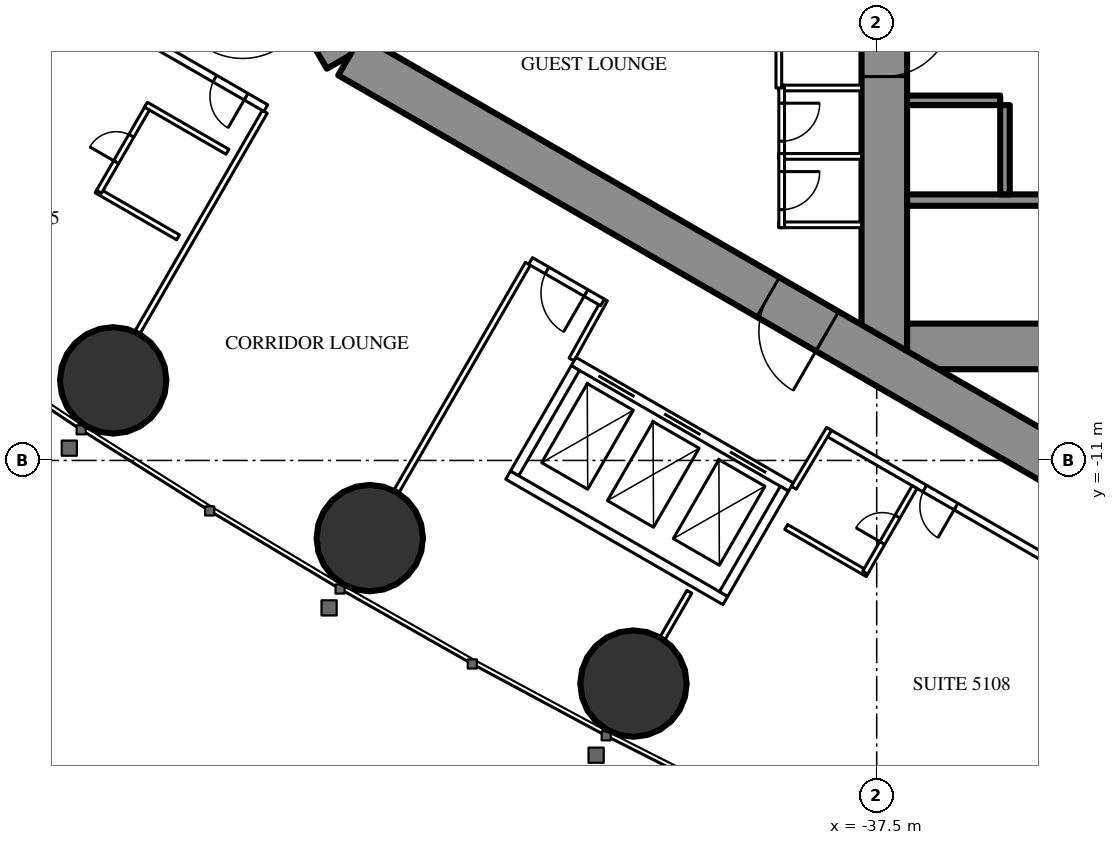
"""IFC4 building model, lengths in metres.
Left out: names, types, materials, properties, quantities, classifications, styles, units other than length and angle.
Written with IfcOpenShell. Run it as: python <this file> out.ifc"""

import sys

from ifc_helpers import new_model, si_unit, direction, frame, frame_2d, origin, origin_2d, place, context, subcontext, project, spatial, rectangle, circle, extrude, element, fill, save


model = new_model("IFC4")
c1 = context("Model", 3, precision=1e-05, world=origin(), true_north=direction((0.0, 1.0)))
c2 = subcontext(c1, "Body", "Model", "MODEL_VIEW")
j1 = project(units=[si_unit("LENGTHUNIT", "METRE"), si_unit("PLANEANGLEUNIT", "RADIAN")], contexts=[c1])
p1 = place(None, origin())
s1 = spatial("IfcSite", under=j1, at=p1, CompositionType="ELEMENT")
p2 = place(p1, origin())
s2 = spatial("IfcBuilding", under=s1, at=p2, CompositionType="ELEMENT")
p3 = place(p2, frame((0.0, 0.0, 191.3)))
s3 = spatial("IfcBuildingStorey", under=s2, at=p3, CompositionType="ELEMENT", Elevation=191.3)
for number, where, z_axis, x_axis in (
    (1, (-57.59, -8.893, 0.0), (0.0, 0.0, 1.0), (1.0, 0.0, 0.0)),
    (2, (-50.839, -13.043, 0.0), (0.0, 0.0, 1.0), (1.0, 0.0, 0.0)),
    (3, (-43.9, -16.871, 0.0), (0.0, 0.0, 1.0), (1.0, 0.0, 0.0)),
):
    element("IfcColumn", number, at=place(p3, frame(where, z_axis=z_axis, x_axis=x_axis)), inside=s3, PredefinedType="COLUMN", context=c2, shape_type="SweptSolid", body=[
        extrude(circle(Radius=1.4, at=origin_2d()), origin(), (0.0, 0.0, 1.0), 3.5),
    ])
p4 = place(p3, frame((-37.3, 8.6, 0.0), z_axis=(0.0, 0.0, 1.0), x_axis=(0.0, -1.0, 0.0)))
e4 = element("IfcWall", 4, at=p4, inside=s3, PredefinedType="SHEAR", context=c2, shape_type="SweptSolid", body=[
    extrude(rectangle(XDim=17.2, YDim=1.2, at=frame_2d((8.6, 0.0))), origin(), (0.0, 0.0, 1.0), 3.5),
])
p5 = place(p4, frame((7.7, 0.0, 0.0)))
e5 = element("IfcOpeningElement", 5, at=p5, cuts=e4, PredefinedType="OPENING", context=c2, shape_type="SweptSolid", body=[
    extrude(rectangle(XDim=1.8, YDim=2.2, at=frame_2d((0.9, 1.1))), frame((0.0, 0.61, 0.0), z_axis=(0.0, -1.0, 0.0), x_axis=(1.0, 0.0, 0.0)), (0.0, 0.0, 1.0), 1.22),
])
p6 = place(p3, frame((-28.3, -8.0, 0.0), z_axis=(0.0, 0.0, 1.0), x_axis=(-1.0, 0.0, 0.0)))
e6 = element("IfcWall", 6, at=p6, inside=s3, PredefinedType="SHEAR", context=c2, shape_type="SweptSolid", body=[
    extrude(rectangle(XDim=8.4, YDim=1.2, at=frame_2d((4.2, 0.0))), origin(), (0.0, 0.0, 1.0), 3.5),
])
p7 = place(p6, frame((0.25, 0.0, 0.0)))
e7 = element("IfcOpeningElement", 7, at=p7, cuts=e6, PredefinedType="OPENING", context=c2, shape_type="SweptSolid", body=[
    extrude(rectangle(XDim=1.0, YDim=2.2, at=frame_2d((0.5, 1.1))), frame((0.0, 0.61, 0.0), z_axis=(0.0, -1.0, 0.0), x_axis=(1.0, 0.0, 0.0)), (0.0, 0.0, 1.0), 1.22),
])
p8 = place(p3, frame((-28.3, -4.15, 0.0), z_axis=(0.0, 0.0, 1.0), x_axis=(-1.0, 0.0, 0.0)))
e8 = element("IfcWall", 8, at=p8, inside=s3, PredefinedType="SHEAR", context=c2, shape_type="SweptSolid", body=[
    extrude(rectangle(XDim=8.4, YDim=0.3, at=frame_2d((4.2, 0.0))), origin(), (0.0, 0.0, 1.0), 3.5),
])
p9 = place(p3, frame((-34.125, -1.65, 0.0), z_axis=(0.0, 0.0, 1.0), x_axis=(0.0, -1.0, 0.0)))
e9 = element("IfcWall", 9, at=p9, inside=s3, PredefinedType="SHEAR", context=c2, shape_type="SweptSolid", body=[
    extrude(rectangle(XDim=2.35, YDim=0.25, at=frame_2d((1.175, 0.0))), origin(), (0.0, 0.0, 1.0), 3.5),
])
p10 = place(p3, frame((-34.25, -1.525, 0.0), z_axis=(0.0, 0.0, 1.0), x_axis=(-1.0, 0.0, 0.0)))
e10 = element("IfcWall", 10, at=p10, inside=s3, PredefinedType="SHEAR", context=c2, shape_type="SweptSolid", body=[
    extrude(rectangle(XDim=2.45, YDim=0.25, at=frame_2d((1.225, 0.0))), origin(), (0.0, 0.0, 1.0), 3.5),
])
p11 = place(p3, frame((-27.2, 14.3, 0.0), z_axis=(0.0, 0.0, 1.0), x_axis=(-0.866026593062, -0.499997940104, 0.0)))
e11 = element("IfcWall", 11, at=p11, inside=s3, PredefinedType="SHEAR", context=c2, shape_type="SweptSolid", body=[
    extrude(rectangle(XDim=28.946, YDim=1.2, at=frame_2d((14.473, 0.0))), origin(), (0.0, 0.0, 1.0), 3.5),
])
p12 = place(p11, frame((4.6, 0.0, 0.0)))
e12 = element("IfcOpeningElement", 12, at=p12, cuts=e11, PredefinedType="OPENING", context=c2, shape_type="SweptSolid", body=[
    extrude(rectangle(XDim=1.0, YDim=2.2, at=frame_2d((0.5, 1.1))), frame((0.0, 0.61, 0.0), z_axis=(0.0, -1.0, 0.0), x_axis=(1.0, 0.0, 0.0)), (0.0, 0.0, 1.0), 1.22),
])
p13 = place(p11, frame((13.395, 0.0, 0.0)))
e13 = element("IfcOpeningElement", 13, at=p13, cuts=e11, PredefinedType="OPENING", context=c2, shape_type="SweptSolid", body=[
    extrude(rectangle(XDim=1.8, YDim=2.2, at=frame_2d((0.9, 1.1))), frame((0.0, 0.61, 0.0), z_axis=(0.0, -1.0, 0.0), x_axis=(1.0, 0.0, 0.0)), (0.0, 0.0, 1.0), 1.22),
])
p14 = place(p3, frame((-27.2, -14.3, 0.0), z_axis=(0.0, 0.0, 1.0), x_axis=(-0.866024021859, 0.500002393557, 0.0)))
e14 = element("IfcWall", 14, at=p14, inside=s3, PredefinedType="SHEAR", context=c2, shape_type="SweptSolid", body=[
    extrude(rectangle(XDim=27.907, YDim=1.2, at=frame_2d((13.954, 0.0))), origin(), (0.0, 0.0, 1.0), 3.5),
])
p15 = place(p14, frame((4.6, 0.0, 0.0)))
e15 = element("IfcOpeningElement", 15, at=p15, cuts=e14, PredefinedType="OPENING", context=c2, shape_type="SweptSolid", body=[
    extrude(rectangle(XDim=1.0, YDim=2.2, at=frame_2d((0.5, 1.1))), frame((0.0, 0.61, 0.0), z_axis=(0.0, -1.0, 0.0), x_axis=(1.0, 0.0, 0.0)), (0.0, 0.0, 1.0), 1.22),
])
p16 = place(p14, frame((13.395, 0.0, 0.0)))
e16 = element("IfcOpeningElement", 16, at=p16, cuts=e14, PredefinedType="OPENING", context=c2, shape_type="SweptSolid", body=[
    extrude(rectangle(XDim=1.8, YDim=2.2, at=frame_2d((0.9, 1.1))), frame((0.0, 0.61, 0.0), z_axis=(0.0, -1.0, 0.0), x_axis=(1.0, 0.0, 0.0)), (0.0, 0.0, 1.0), 1.22),
])
p17 = place(p3, frame((-46.679, -5.825, 0.0), z_axis=(0.0, 0.0, 1.0), x_axis=(-0.500006839597, -0.866021454905, 0.0)))
e17 = element("IfcWall", 17, at=p17, inside=s3, PredefinedType="PARTITIONING", context=c2, shape_type="SweptSolid", body=[
    extrude(rectangle(XDim=6.911, YDim=0.15, at=frame_2d((3.456, 0.0))), origin(), (0.0, 0.0, 1.0), 2.3),
])
p18 = place(p3, frame((-53.602, -1.828, 0.0), z_axis=(0.0, 0.0, 1.0), x_axis=(-0.49999191814, -0.866030069798, 0.0)))
e18 = element("IfcWall", 18, at=p18, inside=s3, PredefinedType="PARTITIONING", context=c2, shape_type="SweptSolid", body=[
    extrude(rectangle(XDim=6.692, YDim=0.15, at=frame_2d((3.346, 0.0))), origin(), (0.0, 0.0, 1.0), 2.3),
])
p19 = place(p3, frame((-42.429, -14.457, 0.0), z_axis=(0.0, 0.0, 1.0), x_axis=(-0.5000578829, -0.865991982497, 0.0)))
e19 = element("IfcWall", 19, at=p19, inside=s3, PredefinedType="PARTITIONING", context=c2, shape_type="SweptSolid", body=[
    extrude(rectangle(XDim=1.407, YDim=0.15, at=frame_2d((0.704, 0.0))), origin(), (0.0, 0.0, 1.0), 3.25),
])
p20 = place(p3, frame((-27.86, -16.575, 0.0), z_axis=(0.0, 0.0, 1.0), x_axis=(-0.866027756871, 0.499995924312, 0.0)))
e20 = element("IfcWall", 20, at=p20, inside=s3, PredefinedType="PARTITIONING", context=c2, shape_type="SweptSolid", body=[
    extrude(rectangle(XDim=12.622, YDim=0.2, at=frame_2d((6.311, 0.0))), origin(), (0.0, 0.0, 1.0), 3.25),
])
p21 = place(p20, frame((8.722, 0.0, 0.0)))
e21 = element("IfcOpeningElement", 21, at=p21, cuts=e20, PredefinedType="OPENING", context=c2, shape_type="SweptSolid", body=[
    extrude(rectangle(XDim=0.95, YDim=2.2, at=frame_2d((0.475, 1.1))), frame((0.0, 0.11, 0.0), z_axis=(0.0, -1.0, 0.0), x_axis=(1.0, 0.0, 0.0)), (0.0, 0.0, 1.0), 0.22),
])
for number, where, z_axis, x_axis in (
    (22, (-39.683, -11.718, 0.0), (0.0, 0.0, 1.0), (0.514, 0.858, 0.0)),
    (23, (-44.652, -6.764, 0.0), (0.0, 0.0, 1.0), (-0.485, -0.874, 0.0)),
):
    element("IfcWall", number, at=place(p3, frame(where, z_axis=z_axis, x_axis=x_axis)), inside=s3, PredefinedType="PARTITIONING", context=c2, shape_type="SweptSolid", body=[
        extrude(rectangle(XDim=1.805, YDim=0.15, at=frame_2d((0.903, 0.0))), origin(), (0.0, 0.0, 1.0), 3.25),
    ])
p22 = place(p3, frame((-44.715, -6.844, 0.0), z_axis=(0.0, 0.0, 1.0), x_axis=(-0.865999496279, 0.500044870432, 0.0)))
e24 = element("IfcWall", 24, at=p22, inside=s3, PredefinedType="PARTITIONING", context=c2, shape_type="SweptSolid", body=[
    extrude(rectangle(XDim=2.185, YDim=0.2, at=frame_2d((1.092, 0.0))), origin(), (0.0, 0.0, 1.0), 3.25),
])
p23 = place(p22, frame((0.5, 0.0, 0.0)))
e25 = element("IfcOpeningElement", 25, at=p23, cuts=e24, PredefinedType="OPENING", context=c2, shape_type="SweptSolid", body=[
    extrude(rectangle(XDim=1.185, YDim=2.2, at=frame_2d((0.593, 1.1))), frame((0.0, 0.11, 0.0), z_axis=(0.0, -1.0, 0.0), x_axis=(1.0, 0.0, 0.0)), (0.0, 0.0, 1.0), 0.22),
])
p24 = place(p3, frame((-53.574, -1.729, 0.0), z_axis=(0.0, 0.0, 1.0), x_axis=(-0.866019930389, 0.500009480079, 0.0)))
e26 = element("IfcWall", 26, at=p24, inside=s3, PredefinedType="PARTITIONING", context=c2, shape_type="SweptSolid", body=[
    extrude(rectangle(XDim=3.338, YDim=0.2, at=frame_2d((1.669, 0.0))), origin(), (0.0, 0.0, 1.0), 3.25),
])
p25 = place(p24, frame((0.6, 0.0, 0.0)))
e27 = element("IfcOpeningElement", 27, at=p25, cuts=e26, PredefinedType="OPENING", context=c2, shape_type="SweptSolid", body=[
    extrude(rectangle(XDim=0.95, YDim=2.2, at=frame_2d((0.475, 1.1))), frame((0.0, 0.11, 0.0), z_axis=(0.0, -1.0, 0.0), x_axis=(1.0, 0.0, 0.0)), (0.0, 0.0, 1.0), 0.22),
])
p26 = place(p3, frame((-55.884, -5.13, 0.0), z_axis=(0.0, 0.0, 1.0), x_axis=(-0.866006523861, 0.500032699561, 0.0)))
e28 = element("IfcWall", 28, at=p26, inside=s3, PredefinedType="PARTITIONING", context=c2, shape_type="SweptSolid", body=[
    extrude(rectangle(XDim=2.475, YDim=0.15, at=frame_2d((1.237, 0.0))), origin(), (0.0, 0.0, 1.0), 3.25),
])
p27 = place(p3, frame((-56.662, -1.678, 0.0), z_axis=(0.0, 0.0, 1.0), x_axis=(-0.500006934395, -0.866021400173, 0.0)))
e29 = element("IfcWall", 29, at=p27, inside=s3, PredefinedType="PARTITIONING", context=c2, shape_type="SweptSolid", body=[
    extrude(rectangle(XDim=2.6, YDim=0.15, at=frame_2d((1.3, 0.0))), origin(), (0.0, 0.0, 1.0), 3.25),
])
p28 = place(p27, frame((0.9, 0.0, 0.0)))
e30 = element("IfcOpeningElement", 30, at=p28, cuts=e29, PredefinedType="OPENING", context=c2, shape_type="SweptSolid", body=[
    extrude(rectangle(XDim=0.8, YDim=2.2, at=frame_2d((0.4, 1.1))), frame((0.0, 0.085, 0.0), z_axis=(0.0, -1.0, 0.0), x_axis=(1.0, 0.0, 0.0)), (0.0, 0.0, 1.0), 0.17),
])
for number, where, z_axis, x_axis in (
    (31, (-54.583, -2.878, 0.0), (0.0, 0.0, 1.0), (-0.866, 0.5, 0.0)),
    (32, (-37.738, -13.989, 0.0), (0.0, 0.0, 1.0), (-0.866, 0.5, 0.0)),
):
    element("IfcWall", number, at=place(p3, frame(where, z_axis=z_axis, x_axis=x_axis)), inside=s3, PredefinedType="PARTITIONING", context=c2, shape_type="SweptSolid", body=[
        extrude(rectangle(XDim=2.475, YDim=0.15, at=frame_2d((1.237, 0.0))), origin(), (0.0, 0.0, 1.0), 3.25),
    ])
p29 = place(p3, frame((-36.503, -11.7, 0.0), z_axis=(0.0, 0.0, 1.0), x_axis=(-0.500006934395, -0.866021400173, 0.0)))
e33 = element("IfcWall", 33, at=p29, inside=s3, PredefinedType="PARTITIONING", context=c2, shape_type="SweptSolid", body=[
    extrude(rectangle(XDim=2.6, YDim=0.15, at=frame_2d((1.3, 0.0))), origin(), (0.0, 0.0, 1.0), 3.25),
])
p30 = place(p29, frame((0.9, 0.0, 0.0)))
e34 = element("IfcOpeningElement", 34, at=p30, cuts=e33, PredefinedType="OPENING", context=c2, shape_type="SweptSolid", body=[
    extrude(rectangle(XDim=0.8, YDim=2.2, at=frame_2d((0.4, 1.1))), frame((0.0, 0.085, 0.0), z_axis=(0.0, -1.0, 0.0), x_axis=(1.0, 0.0, 0.0)), (0.0, 0.0, 1.0), 0.17),
])
for number, where, z_axis, x_axis in (
    (35, (-37.9, -1.2, 0.0), (0.0, 0.0, 1.0), (-1.0, 0.0, 0.0)),
    (36, (-37.9, -3.0, 0.0), (0.0, 0.0, 1.0), (-1.0, 0.0, 0.0)),
    (37, (-37.9, -4.8, 0.0), (0.0, 0.0, 1.0), (-1.0, 0.0, 0.0)),
):
    element("IfcWall", number, at=place(p3, frame(where, z_axis=z_axis, x_axis=x_axis)), inside=s3, PredefinedType="PARTITIONING", context=c2, shape_type="SweptSolid", body=[
        extrude(rectangle(XDim=2.175, YDim=0.15, at=frame_2d((1.087, 0.0))), origin(), (0.0, 0.0, 1.0), 3.25),
    ])
p31 = place(p3, frame((-40.0, -1.125, 0.0), z_axis=(0.0, 0.0, 1.0), x_axis=(0.0, -1.0, 0.0)))
e38 = element("IfcWall", 38, at=p31, inside=s3, PredefinedType="PARTITIONING", context=c2, shape_type="SweptSolid", body=[
    extrude(rectangle(XDim=1.95, YDim=0.15, at=frame_2d((0.975, 0.0))), origin(), (0.0, 0.0, 1.0), 3.25),
])
p32 = place(p31, frame((0.475, 0.0, 0.0)))
e39 = element("IfcOpeningElement", 39, at=p32, cuts=e38, PredefinedType="OPENING", context=c2, shape_type="SweptSolid", body=[
    extrude(rectangle(XDim=1.0, YDim=2.2, at=frame_2d((0.5, 1.1))), frame((0.0, 0.085, 0.0), z_axis=(0.0, -1.0, 0.0), x_axis=(1.0, 0.0, 0.0)), (0.0, 0.0, 1.0), 0.17),
])
p33 = place(p3, frame((-40.0, -2.925, 0.0), z_axis=(0.0, 0.0, 1.0), x_axis=(0.0, -1.0, 0.0)))
e40 = element("IfcWall", 40, at=p33, inside=s3, PredefinedType="PARTITIONING", context=c2, shape_type="SweptSolid", body=[
    extrude(rectangle(XDim=1.95, YDim=0.15, at=frame_2d((0.975, 0.0))), origin(), (0.0, 0.0, 1.0), 3.25),
])
p34 = place(p33, frame((0.475, 0.0, 0.0)))
e41 = element("IfcOpeningElement", 41, at=p34, cuts=e40, PredefinedType="OPENING", context=c2, shape_type="SweptSolid", body=[
    extrude(rectangle(XDim=1.0, YDim=2.2, at=frame_2d((0.5, 1.1))), frame((0.0, 0.085, 0.0), z_axis=(0.0, -1.0, 0.0), x_axis=(1.0, 0.0, 0.0)), (0.0, 0.0, 1.0), 0.17),
])
p35 = place(p3, frame((-40.075, 6.174, 0.0), z_axis=(0.0, 0.0, 1.0), x_axis=(0.0, -1.0, 0.0)))
e42 = element("IfcWall", 42, at=p35, inside=s3, PredefinedType="PARTITIONING", context=c2, shape_type="SweptSolid", body=[
    extrude(rectangle(XDim=7.374, YDim=0.15, at=frame_2d((3.687, 0.0))), origin(), (0.0, 0.0, 1.0), 3.25),
])
p36 = place(p35, frame((2.787, 0.0, 0.0)))
e43 = element("IfcOpeningElement", 43, at=p36, cuts=e42, PredefinedType="OPENING", context=c2, shape_type="SweptSolid", body=[
    extrude(rectangle(XDim=1.8, YDim=2.2, at=frame_2d((0.9, 1.1))), frame((0.0, 0.085, 0.0), z_axis=(0.0, -1.0, 0.0), x_axis=(1.0, 0.0, 0.0)), (0.0, 0.0, 1.0), 0.17),
])
p37 = place(p3, frame((-39.758, -11.697, 0.0), z_axis=(0.0, 0.0, 1.0), x_axis=(-0.866024194504, 0.500002094529, 0.0)))
e44 = element("IfcWall", 44, at=p37, inside=s3, PredefinedType="PARTITIONING", context=c2, shape_type="SweptSolid", body=[
    extrude(rectangle(XDim=6.6, YDim=0.25, at=frame_2d((3.3, 0.0))), origin(), (0.0, 0.0, 1.0), 3.25),
])
p38 = place(p37, frame((0.75, 0.0, 0.0)))
e45 = element("IfcOpeningElement", 45, at=p38, cuts=e44, PredefinedType="OPENING", context=c2, shape_type="SweptSolid", body=[
    extrude(rectangle(XDim=1.1, YDim=2.2, at=frame_2d((0.55, 1.1))), frame((0.0, 0.135, 0.0), z_axis=(0.0, -1.0, 0.0), x_axis=(1.0, 0.0, 0.0)), (0.0, 0.0, 1.0), 0.27),
])
p39 = place(p37, frame((2.75, 0.0, 0.0)))
e46 = element("IfcOpeningElement", 46, at=p39, cuts=e44, PredefinedType="OPENING", context=c2, shape_type="SweptSolid", body=[
    extrude(rectangle(XDim=1.1, YDim=2.2, at=frame_2d((0.55, 1.1))), frame((0.0, 0.135, 0.0), z_axis=(0.0, -1.0, 0.0), x_axis=(1.0, 0.0, 0.0)), (0.0, 0.0, 1.0), 0.27),
])
p40 = place(p37, frame((4.75, 0.0, 0.0)))
e47 = element("IfcOpeningElement", 47, at=p40, cuts=e44, PredefinedType="OPENING", context=c2, shape_type="SweptSolid", body=[
    extrude(rectangle(XDim=1.1, YDim=2.2, at=frame_2d((0.55, 1.1))), frame((0.0, 0.135, 0.0), z_axis=(0.0, -1.0, 0.0), x_axis=(1.0, 0.0, 0.0)), (0.0, 0.0, 1.0), 0.27),
])
p41 = place(p3, frame((-41.482, -14.686, 0.0), z_axis=(0.0, 0.0, 1.0), x_axis=(-0.86603344179, 0.499986077507, 0.0)))
e48 = element("IfcWall", 48, at=p41, inside=s3, PredefinedType="PARTITIONING", context=c2, shape_type="SweptSolid", body=[
    extrude(rectangle(XDim=6.6, YDim=0.25, at=frame_2d((3.3, 0.0))), origin(), (0.0, 0.0, 1.0), 3.25),
])
for number, where, z_axis, x_axis in (
    (49, (-39.928, -11.743, 0.0), (0.0, 0.0, 1.0), (-0.5, -0.866, 0.0)),
    (50, (-45.428, -8.568, 0.0), (0.0, 0.0, 1.0), (-0.5, -0.866, 0.0)),
):
    element("IfcWall", number, at=place(p3, frame(where, z_axis=z_axis, x_axis=x_axis)), inside=s3, PredefinedType="PARTITIONING", context=c2, shape_type="SweptSolid", body=[
        extrude(rectangle(XDim=3.201, YDim=0.25, at=frame_2d((1.6, 0.0))), origin(), (0.0, 0.0, 1.0), 3.25),
    ])
p42 = place(p28, origin())
e51 = element("IfcDoor", 51, at=p42, inside=s3, OperationType="SINGLE_SWING_RIGHT", PredefinedType="DOOR", context=c2, shape_type="SweptSolid", body=[
    extrude(rectangle(XDim=0.8, YDim=2.2, at=frame_2d((0.4, 1.1))), frame((0.0, 0.025, 0.0), z_axis=(0.0, -1.0, 0.0), x_axis=(1.0, 0.0, 0.0)), (0.0, 0.0, 1.0), 0.05),
])
fill(e30, e51)
p43 = place(p25, origin())
e52 = element("IfcDoor", 52, at=p43, inside=s3, OperationType="SINGLE_SWING_LEFT", PredefinedType="DOOR", context=c2, shape_type="SweptSolid", body=[
    extrude(rectangle(XDim=0.95, YDim=2.2, at=frame_2d((0.475, 1.1))), frame((0.0, 0.025, 0.0), z_axis=(0.0, -1.0, 0.0), x_axis=(1.0, 0.0, 0.0)), (0.0, 0.0, 1.0), 0.05),
])
fill(e27, e52)
p44 = place(p30, origin())
e53 = element("IfcDoor", 53, at=p44, inside=s3, OperationType="SINGLE_SWING_RIGHT", PredefinedType="DOOR", context=c2, shape_type="SweptSolid", body=[
    extrude(rectangle(XDim=0.8, YDim=2.2, at=frame_2d((0.4, 1.1))), frame((0.0, 0.025, 0.0), z_axis=(0.0, -1.0, 0.0), x_axis=(1.0, 0.0, 0.0)), (0.0, 0.0, 1.0), 0.05),
])
fill(e34, e53)
p45 = place(p21, origin())
e54 = element("IfcDoor", 54, at=p45, inside=s3, OperationType="SINGLE_SWING_LEFT", PredefinedType="DOOR", context=c2, shape_type="SweptSolid", body=[
    extrude(rectangle(XDim=0.95, YDim=2.2, at=frame_2d((0.475, 1.1))), frame((0.0, 0.025, 0.0), z_axis=(0.0, -1.0, 0.0), x_axis=(1.0, 0.0, 0.0)), (0.0, 0.0, 1.0), 0.05),
])
fill(e21, e54)
p46 = place(p23, origin())
e55 = element("IfcDoor", 55, at=p46, inside=s3, OperationType="SINGLE_SWING_LEFT", PredefinedType="DOOR", context=c2, shape_type="SweptSolid", body=[
    extrude(rectangle(XDim=1.185, YDim=2.2, at=frame_2d((0.593, 1.1))), frame((0.0, 0.025, 0.0), z_axis=(0.0, -1.0, 0.0), x_axis=(1.0, 0.0, 0.0)), (0.0, 0.0, 1.0), 0.05),
])
fill(e25, e55)
p47 = place(p32, origin())
e56 = element("IfcDoor", 56, at=p47, inside=s3, OperationType="SINGLE_SWING_LEFT", PredefinedType="DOOR", context=c2, shape_type="SweptSolid", body=[
    extrude(rectangle(XDim=1.0, YDim=2.2, at=frame_2d((0.5, 1.1))), frame((0.0, 0.025, 0.0), z_axis=(0.0, -1.0, 0.0), x_axis=(1.0, 0.0, 0.0)), (0.0, 0.0, 1.0), 0.05),
])
fill(e39, e56)
p48 = place(p34, origin())
e57 = element("IfcDoor", 57, at=p48, inside=s3, OperationType="SINGLE_SWING_LEFT", PredefinedType="DOOR", context=c2, shape_type="SweptSolid", body=[
    extrude(rectangle(XDim=1.0, YDim=2.2, at=frame_2d((0.5, 1.1))), frame((0.0, 0.025, 0.0), z_axis=(0.0, -1.0, 0.0), x_axis=(1.0, 0.0, 0.0)), (0.0, 0.0, 1.0), 0.05),
])
fill(e41, e57)
p49 = place(p16, origin())
e58 = element("IfcDoor", 58, at=p49, inside=s3, OperationType="DOUBLE_DOOR_SINGLE_SWING", PredefinedType="DOOR", context=c2, shape_type="SweptSolid", body=[
    extrude(rectangle(XDim=1.8, YDim=2.2, at=frame_2d((0.9, 1.1))), frame((0.0, 0.025, 0.0), z_axis=(0.0, -1.0, 0.0), x_axis=(1.0, 0.0, 0.0)), (0.0, 0.0, 1.0), 0.05),
])
fill(e16, e58)
p50 = place(p5, origin())
e59 = element("IfcDoor", 59, at=p50, inside=s3, OperationType="DOUBLE_DOOR_SINGLE_SWING", PredefinedType="DOOR", context=c2, shape_type="SweptSolid", body=[
    extrude(rectangle(XDim=1.8, YDim=2.2, at=frame_2d((0.9, 1.1))), frame((0.0, 0.025, 0.0), z_axis=(0.0, -1.0, 0.0), x_axis=(1.0, 0.0, 0.0)), (0.0, 0.0, 1.0), 0.05),
])
fill(e5, e59)
p51 = place(p38, origin())
e60 = element("IfcDoor", 60, at=p51, inside=s3, OperationType="DOUBLE_DOOR_SLIDING", PredefinedType="USERDEFINED", context=c2, shape_type="SweptSolid", body=[
    extrude(rectangle(XDim=1.1, YDim=2.2, at=frame_2d((0.55, 1.1))), frame((0.0, 0.025, 0.0), z_axis=(0.0, -1.0, 0.0), x_axis=(1.0, 0.0, 0.0)), (0.0, 0.0, 1.0), 0.05),
])
fill(e45, e60)
p52 = place(p39, origin())
e61 = element("IfcDoor", 61, at=p52, inside=s3, OperationType="DOUBLE_DOOR_SLIDING", PredefinedType="USERDEFINED", context=c2, shape_type="SweptSolid", body=[
    extrude(rectangle(XDim=1.1, YDim=2.2, at=frame_2d((0.55, 1.1))), frame((0.0, 0.025, 0.0), z_axis=(0.0, -1.0, 0.0), x_axis=(1.0, 0.0, 0.0)), (0.0, 0.0, 1.0), 0.05),
])
fill(e46, e61)
p53 = place(p40, origin())
e62 = element("IfcDoor", 62, at=p53, inside=s3, OperationType="DOUBLE_DOOR_SLIDING", PredefinedType="USERDEFINED", context=c2, shape_type="SweptSolid", body=[
    extrude(rectangle(XDim=1.1, YDim=2.2, at=frame_2d((0.55, 1.1))), frame((0.0, 0.025, 0.0), z_axis=(0.0, -1.0, 0.0), x_axis=(1.0, 0.0, 0.0)), (0.0, 0.0, 1.0), 0.05),
])
fill(e47, e62)
save(model, sys.argv[1])
